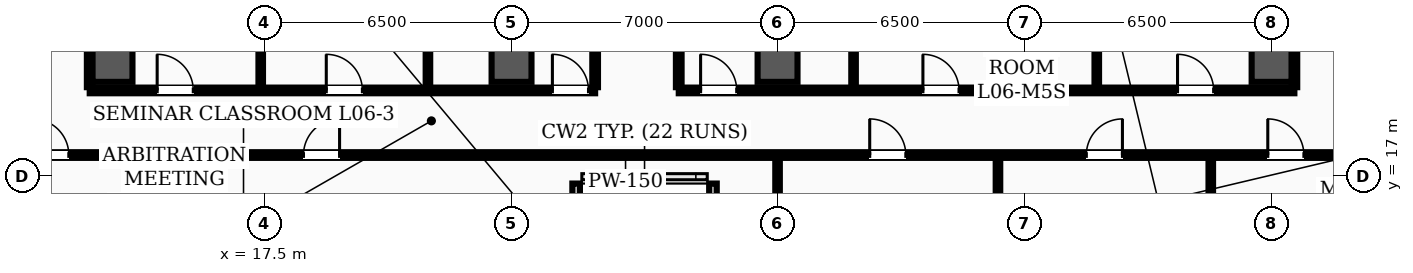
"""IFC4 building model, lengths in metres.
Left out: names, types, materials, properties, quantities, classifications, styles, units other than length and angle.
Written with IfcOpenShell. Run it as: python <this file> out.ifc"""

import sys

from ifc_helpers import new_model, si_unit, direction, frame, frame_2d, origin, origin_2d, place, context, subcontext, project, spatial, rectangle, hollow_rectangle, extrude, element, fill, save


model = new_model("IFC4")
c1 = context("Model", 3, precision=1e-05, world=origin(), true_north=direction((0.0, 1.0)))
c2 = subcontext(c1, "Body", "Model", "MODEL_VIEW")
j1 = project(units=[si_unit("LENGTHUNIT", "METRE"), si_unit("PLANEANGLEUNIT", "RADIAN")], contexts=[c1])
p1 = place(None, origin())
s1 = spatial("IfcSite", under=j1, at=p1, CompositionType="ELEMENT")
p2 = place(p1, origin())
s2 = spatial("IfcBuilding", under=s1, at=p2, CompositionType="ELEMENT")
p3 = place(p2, frame((0.0, 0.0, 26.5)))
s3 = spatial("IfcBuildingStorey", under=s2, at=p3, CompositionType="ELEMENT", Elevation=26.5)
for number, where, z_axis, x_axis in (
    (1, (13.5, 20.0, 0.0), (0.0, 0.0, 1.0), (1.0, 0.0, 0.0)),
    (2, (24.0, 20.0, 0.0), (0.0, 0.0, 1.0), (1.0, 0.0, 0.0)),
    (3, (31.0, 20.0, 0.0), (0.0, 0.0, 1.0), (1.0, 0.0, 0.0)),
    (4, (37.5, 20.0, 0.0), (0.0, 0.0, 1.0), (1.0, 0.0, 0.0)),
    (5, (44.0, 20.0, 0.0), (0.0, 0.0, 1.0), (1.0, 0.0, 0.0)),
):
    element("IfcColumn", number, at=place(p3, frame(where, z_axis=z_axis, x_axis=x_axis)), inside=s3, PredefinedType="COLUMN", context=c2, shape_type="SweptSolid", body=[
        extrude(hollow_rectangle(XDim=1.05, YDim=1.05, WallThickness=0.038, InnerFilletRadius=0.019, OuterFilletRadius=0.057, at=origin_2d()), origin(), (0.0, 0.0, 1.0), 3.9),
    ])
for number, where, z_axis, x_axis in (
    (6, (25.7, 15.1, 0.0), (0.0, 0.0, 1.0), (0.0, 1.0, 0.0)),
    (7, (29.3, 16.8, 0.0), (0.0, 0.0, 1.0), (0.0, -1.0, 0.0)),
):
    element("IfcWall", number, at=place(p3, frame(where, z_axis=z_axis, x_axis=x_axis)), inside=s3, PredefinedType="PARAPET", context=c2, shape_type="SweptSolid", body=[
        extrude(rectangle(XDim=1.7, YDim=0.2, at=frame_2d((0.85, 0.0))), origin(), (0.0, 0.0, 1.0), 1.2),
    ])
p4 = place(p3, frame((4.66, 17.55, 0.0), z_axis=(0.0, 0.0, 1.0), x_axis=(1.0, 0.0, 0.0)))
e8 = element("IfcWall", 8, at=p4, inside=s3, PredefinedType="PARTITIONING", context=c2, shape_type="SweptSolid", body=[
    extrude(rectangle(XDim=44.68, YDim=0.15, at=frame_2d((22.34, 0.0))), origin(), (0.0, 0.0, 1.0), 3.1),
])
p5 = place(p4, frame((6.74, 0.0, 0.0)))
e9 = element("IfcOpeningElement", 9, at=p5, cuts=e8, PredefinedType="OPENING", context=c2, shape_type="SweptSolid", body=[
    extrude(rectangle(XDim=0.95, YDim=2.08, at=frame_2d((0.475, 1.04))), frame((0.0, 0.085, 0.0), z_axis=(0.0, -1.0, 0.0), x_axis=(1.0, 0.0, 0.0)), (0.0, 0.0, 1.0), 0.17),
])
p6 = place(p4, frame((13.865, 0.0, 0.0)))
e10 = element("IfcOpeningElement", 10, at=p6, cuts=e8, PredefinedType="OPENING", context=c2, shape_type="SweptSolid", body=[
    extrude(rectangle(XDim=0.95, YDim=2.08, at=frame_2d((0.475, 1.04))), frame((0.0, 0.085, 0.0), z_axis=(0.0, -1.0, 0.0), x_axis=(1.0, 0.0, 0.0)), (0.0, 0.0, 1.0), 0.17),
])
p7 = place(p4, frame((28.765, 0.0, 0.0)))
e11 = element("IfcOpeningElement", 11, at=p7, cuts=e8, PredefinedType="OPENING", context=c2, shape_type="SweptSolid", body=[
    extrude(rectangle(XDim=0.95, YDim=2.08, at=frame_2d((0.475, 1.04))), frame((0.0, 0.085, 0.0), z_axis=(0.0, -1.0, 0.0), x_axis=(1.0, 0.0, 0.0)), (0.0, 0.0, 1.0), 0.17),
])
p8 = place(p4, frame((34.465, 0.0, 0.0)))
e12 = element("IfcOpeningElement", 12, at=p8, cuts=e8, PredefinedType="OPENING", context=c2, shape_type="SweptSolid", body=[
    extrude(rectangle(XDim=0.95, YDim=2.08, at=frame_2d((0.475, 1.04))), frame((0.0, 0.085, 0.0), z_axis=(0.0, -1.0, 0.0), x_axis=(1.0, 0.0, 0.0)), (0.0, 0.0, 1.0), 0.17),
])
p9 = place(p4, frame((39.24, 0.0, 0.0)))
e13 = element("IfcOpeningElement", 13, at=p9, cuts=e8, PredefinedType="OPENING", context=c2, shape_type="SweptSolid", body=[
    extrude(rectangle(XDim=0.95, YDim=2.08, at=frame_2d((0.475, 1.04))), frame((0.0, 0.085, 0.0), z_axis=(0.0, -1.0, 0.0), x_axis=(1.0, 0.0, 0.0)), (0.0, 0.0, 1.0), 0.17),
])
p10 = place(p3, frame((12.9, 19.25, 0.0), z_axis=(0.0, 0.0, 1.0), x_axis=(1.0, 0.0, 0.0)))
e14 = element("IfcWall", 14, at=p10, inside=s3, PredefinedType="PARTITIONING", context=c2, shape_type="SweptSolid", body=[
    extrude(rectangle(XDim=13.3, YDim=0.15, at=frame_2d((6.65, 0.0))), origin(), (0.0, 0.0, 1.0), 3.1),
])
p11 = place(p10, frame((1.775, 0.0, 0.0)))
e15 = element("IfcOpeningElement", 15, at=p11, cuts=e14, PredefinedType="OPENING", context=c2, shape_type="SweptSolid", body=[
    extrude(rectangle(XDim=0.95, YDim=2.08, at=frame_2d((0.475, 1.04))), frame((0.0, 0.085, 0.0), z_axis=(0.0, -1.0, 0.0), x_axis=(1.0, 0.0, 0.0)), (0.0, 0.0, 1.0), 0.17),
])
p12 = place(p10, frame((6.225, 0.0, 0.0)))
e16 = element("IfcOpeningElement", 16, at=p12, cuts=e14, PredefinedType="OPENING", context=c2, shape_type="SweptSolid", body=[
    extrude(rectangle(XDim=0.95, YDim=2.08, at=frame_2d((0.475, 1.04))), frame((0.0, 0.085, 0.0), z_axis=(0.0, -1.0, 0.0), x_axis=(1.0, 0.0, 0.0)), (0.0, 0.0, 1.0), 0.17),
])
p13 = place(p10, frame((12.175, 0.0, 0.0)))
e17 = element("IfcOpeningElement", 17, at=p13, cuts=e14, PredefinedType="OPENING", context=c2, shape_type="SweptSolid", body=[
    extrude(rectangle(XDim=0.95, YDim=2.08, at=frame_2d((0.475, 1.04))), frame((0.0, 0.085, 0.0), z_axis=(0.0, -1.0, 0.0), x_axis=(1.0, 0.0, 0.0)), (0.0, 0.0, 1.0), 0.17),
])
p14 = place(p3, frame((28.4, 19.25, 0.0), z_axis=(0.0, 0.0, 1.0), x_axis=(1.0, 0.0, 0.0)))
e18 = element("IfcWall", 18, at=p14, inside=s3, PredefinedType="PARTITIONING", context=c2, shape_type="SweptSolid", body=[
    extrude(rectangle(XDim=16.2, YDim=0.15, at=frame_2d((8.1, 0.0))), origin(), (0.0, 0.0, 1.0), 3.1),
])
p15 = place(p14, frame((0.575, 0.0, 0.0)))
e19 = element("IfcOpeningElement", 19, at=p15, cuts=e18, PredefinedType="OPENING", context=c2, shape_type="SweptSolid", body=[
    extrude(rectangle(XDim=0.95, YDim=2.08, at=frame_2d((0.475, 1.04))), frame((0.0, 0.085, 0.0), z_axis=(0.0, -1.0, 0.0), x_axis=(1.0, 0.0, 0.0)), (0.0, 0.0, 1.0), 0.17),
])
p16 = place(p14, frame((6.425, 0.0, 0.0)))
e20 = element("IfcOpeningElement", 20, at=p16, cuts=e18, PredefinedType="OPENING", context=c2, shape_type="SweptSolid", body=[
    extrude(rectangle(XDim=0.95, YDim=2.08, at=frame_2d((0.475, 1.04))), frame((0.0, 0.085, 0.0), z_axis=(0.0, -1.0, 0.0), x_axis=(1.0, 0.0, 0.0)), (0.0, 0.0, 1.0), 0.17),
])
p17 = place(p14, frame((13.125, 0.0, 0.0)))
e21 = element("IfcOpeningElement", 21, at=p17, cuts=e18, PredefinedType="OPENING", context=c2, shape_type="SweptSolid", body=[
    extrude(rectangle(XDim=0.95, YDim=2.08, at=frame_2d((0.475, 1.04))), frame((0.0, 0.085, 0.0), z_axis=(0.0, -1.0, 0.0), x_axis=(1.0, 0.0, 0.0)), (0.0, 0.0, 1.0), 0.17),
])
for number, where, z_axis, x_axis in (
    (22, (26.2, 19.335, 0.0), (0.0, 0.0, 1.0), (0.0, 1.0, 0.0)),
    (23, (28.4, 19.335, 0.0), (0.0, 0.0, 1.0), (0.0, 1.0, 0.0)),
    (24, (12.9, 19.335, 0.0), (0.0, 0.0, 1.0), (0.0, 1.0, 0.0)),
    (25, (44.6, 19.335, 0.0), (0.0, 0.0, 1.0), (0.0, 1.0, 0.0)),
):
    element("IfcWall", number, at=place(p3, frame(where, z_axis=z_axis, x_axis=x_axis)), inside=s3, PredefinedType="PARTITIONING", context=c2, shape_type="SweptSolid", body=[
        extrude(rectangle(XDim=7.38, YDim=0.15, at=frame_2d((3.69, 0.0))), origin(), (0.0, 0.0, 1.0), 3.0),
    ])
p18 = place(p3, frame((15.8, 15.31, 0.0), z_axis=(0.0, 0.0, 1.0), x_axis=(0.0, 1.0, 0.0)))
e26 = element("IfcWall", 26, at=p18, inside=s3, PredefinedType="PARTITIONING", context=c2, shape_type="SweptSolid", body=[
    extrude(rectangle(XDim=2.155, YDim=0.12, at=frame_2d((1.078, 0.0))), origin(), (0.0, 0.0, 1.0), 3.212),
])
p19 = place(p3, frame((31.0, 15.31, 0.0), z_axis=(0.0, 0.0, 1.0), x_axis=(0.0, 1.0, 0.0)))
e27 = element("IfcWall", 27, at=p19, inside=s3, PredefinedType="PARTITIONING", context=c2, shape_type="SweptSolid", body=[
    extrude(rectangle(XDim=2.155, YDim=0.12, at=frame_2d((1.078, 0.0))), origin(), (0.0, 0.0, 1.0), 3.1),
])
for number, where, z_axis, x_axis in (
    (28, (36.8, 15.31, 0.0), (0.0, 0.0, 1.0), (0.0, 1.0, 0.0)),
    (29, (42.4, 15.31, 0.0), (0.0, 0.0, 1.0), (0.0, 1.0, 0.0)),
):
    element("IfcWall", number, at=place(p3, frame(where, z_axis=z_axis, x_axis=x_axis)), inside=s3, PredefinedType="PARTITIONING", context=c2, shape_type="SweptSolid", body=[
        extrude(rectangle(XDim=2.155, YDim=0.12, at=frame_2d((1.078, 0.0))), origin(), (0.0, 0.0, 1.0), 3.212),
    ])
for number, where, z_axis, x_axis in (
    (30, (17.4, 19.335, 0.0), (0.0, 0.0, 1.0), (0.0, 1.0, 0.0)),
    (31, (21.8, 19.335, 0.0), (0.0, 0.0, 1.0), (0.0, 1.0, 0.0)),
    (32, (33.0, 19.335, 0.0), (0.0, 0.0, 1.0), (0.0, 1.0, 0.0)),
    (33, (39.4, 19.335, 0.0), (0.0, 0.0, 1.0), (0.0, 1.0, 0.0)),
):
    element("IfcWall", number, at=place(p3, frame(where, z_axis=z_axis, x_axis=x_axis)), inside=s3, PredefinedType="PARTITIONING", context=c2, shape_type="SweptSolid", body=[
        extrude(rectangle(XDim=7.38, YDim=0.12, at=frame_2d((3.69, 0.0))), origin(), (0.0, 0.0, 1.0), 3.0),
    ])
p20 = place(p5, origin())
e34 = element("IfcDoor", 34, at=p20, inside=s3, OperationType="SINGLE_SWING_LEFT", PredefinedType="DOOR", context=c2, shape_type="SweptSolid", body=[
    extrude(rectangle(XDim=0.95, YDim=2.08, at=frame_2d((0.475, 1.04))), frame((0.0, 0.025, 0.0), z_axis=(0.0, -1.0, 0.0), x_axis=(1.0, 0.0, 0.0)), (0.0, 0.0, 1.0), 0.05),
])
fill(e9, e34)
p21 = place(p6, origin())
e35 = element("IfcDoor", 35, at=p21, inside=s3, OperationType="SINGLE_SWING_RIGHT", PredefinedType="DOOR", context=c2, shape_type="SweptSolid", body=[
    extrude(rectangle(XDim=0.95, YDim=2.08, at=frame_2d((0.475, 1.04))), frame((0.0, 0.025, 0.0), z_axis=(0.0, -1.0, 0.0), x_axis=(1.0, 0.0, 0.0)), (0.0, 0.0, 1.0), 0.05),
])
fill(e10, e35)
p22 = place(p7, origin())
e36 = element("IfcDoor", 36, at=p22, inside=s3, OperationType="SINGLE_SWING_LEFT", PredefinedType="DOOR", context=c2, shape_type="SweptSolid", body=[
    extrude(rectangle(XDim=0.95, YDim=2.08, at=frame_2d((0.475, 1.04))), frame((0.0, 0.025, 0.0), z_axis=(0.0, -1.0, 0.0), x_axis=(1.0, 0.0, 0.0)), (0.0, 0.0, 1.0), 0.05),
])
fill(e11, e36)
p23 = place(p8, origin())
e37 = element("IfcDoor", 37, at=p23, inside=s3, OperationType="SINGLE_SWING_RIGHT", PredefinedType="DOOR", context=c2, shape_type="SweptSolid", body=[
    extrude(rectangle(XDim=0.95, YDim=2.08, at=frame_2d((0.475, 1.04))), frame((0.0, 0.025, 0.0), z_axis=(0.0, -1.0, 0.0), x_axis=(1.0, 0.0, 0.0)), (0.0, 0.0, 1.0), 0.05),
])
fill(e12, e37)
p24 = place(p9, origin())
e38 = element("IfcDoor", 38, at=p24, inside=s3, OperationType="SINGLE_SWING_LEFT", PredefinedType="DOOR", context=c2, shape_type="SweptSolid", body=[
    extrude(rectangle(XDim=0.95, YDim=2.08, at=frame_2d((0.475, 1.04))), frame((0.0, 0.025, 0.0), z_axis=(0.0, -1.0, 0.0), x_axis=(1.0, 0.0, 0.0)), (0.0, 0.0, 1.0), 0.05),
])
fill(e13, e38)
p25 = place(p11, origin())
e39 = element("IfcDoor", 39, at=p25, inside=s3, OperationType="SINGLE_SWING_LEFT", PredefinedType="DOOR", context=c2, shape_type="SweptSolid", body=[
    extrude(rectangle(XDim=0.95, YDim=2.08, at=frame_2d((0.475, 1.04))), frame((0.0, 0.025, 0.0), z_axis=(0.0, -1.0, 0.0), x_axis=(1.0, 0.0, 0.0)), (0.0, 0.0, 1.0), 0.05),
])
fill(e15, e39)
p26 = place(p12, origin())
e40 = element("IfcDoor", 40, at=p26, inside=s3, OperationType="SINGLE_SWING_LEFT", PredefinedType="DOOR", context=c2, shape_type="SweptSolid", body=[
    extrude(rectangle(XDim=0.95, YDim=2.08, at=frame_2d((0.475, 1.04))), frame((0.0, 0.025, 0.0), z_axis=(0.0, -1.0, 0.0), x_axis=(1.0, 0.0, 0.0)), (0.0, 0.0, 1.0), 0.05),
])
fill(e16, e40)
p27 = place(p13, origin())
e41 = element("IfcDoor", 41, at=p27, inside=s3, OperationType="SINGLE_SWING_LEFT", PredefinedType="DOOR", context=c2, shape_type="SweptSolid", body=[
    extrude(rectangle(XDim=0.95, YDim=2.08, at=frame_2d((0.475, 1.04))), frame((0.0, 0.025, 0.0), z_axis=(0.0, -1.0, 0.0), x_axis=(1.0, 0.0, 0.0)), (0.0, 0.0, 1.0), 0.05),
])
fill(e17, e41)
p28 = place(p15, origin())
e42 = element("IfcDoor", 42, at=p28, inside=s3, OperationType="SINGLE_SWING_LEFT", PredefinedType="DOOR", context=c2, shape_type="SweptSolid", body=[
    extrude(rectangle(XDim=0.95, YDim=2.08, at=frame_2d((0.475, 1.04))), frame((0.0, 0.025, 0.0), z_axis=(0.0, -1.0, 0.0), x_axis=(1.0, 0.0, 0.0)), (0.0, 0.0, 1.0), 0.05),
])
fill(e19, e42)
p29 = place(p16, origin())
e43 = element("IfcDoor", 43, at=p29, inside=s3, OperationType="SINGLE_SWING_LEFT", PredefinedType="DOOR", context=c2, shape_type="SweptSolid", body=[
    extrude(rectangle(XDim=0.95, YDim=2.08, at=frame_2d((0.475, 1.04))), frame((0.0, 0.025, 0.0), z_axis=(0.0, -1.0, 0.0), x_axis=(1.0, 0.0, 0.0)), (0.0, 0.0, 1.0), 0.05),
])
fill(e20, e43)
p30 = place(p17, origin())
e44 = element("IfcDoor", 44, at=p30, inside=s3, OperationType="SINGLE_SWING_LEFT", PredefinedType="DOOR", context=c2, shape_type="SweptSolid", body=[
    extrude(rectangle(XDim=0.95, YDim=2.08, at=frame_2d((0.475, 1.04))), frame((0.0, 0.025, 0.0), z_axis=(0.0, -1.0, 0.0), x_axis=(1.0, 0.0, 0.0)), (0.0, 0.0, 1.0), 0.05),
])
fill(e21, e44)
save(model, sys.argv[1])
